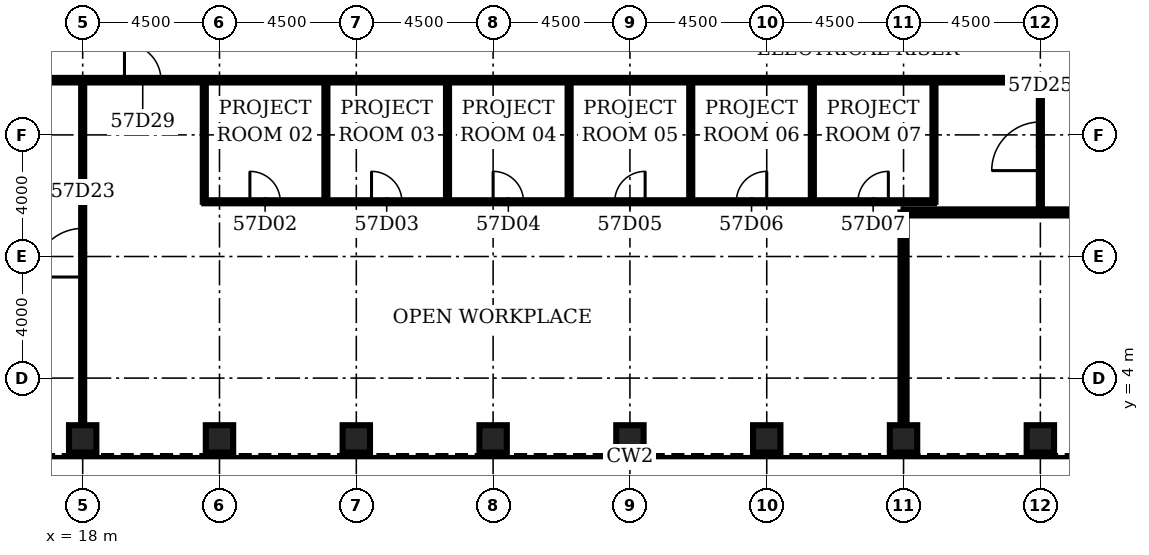
"""IFC4 building model, lengths in metres.
Left out: names, types, materials, properties, quantities, classifications, styles, units other than length and angle.
Written with IfcOpenShell. Run it as: python <this file> out.ifc"""

import sys

from ifc_helpers import new_model, si_unit, direction, frame, frame_2d, origin, origin_2d, place, context, subcontext, project, spatial, rectangle, hollow_rectangle, extrude, element, fill, save


model = new_model("IFC4")
c1 = context("Model", 3, precision=1e-05, world=origin(), true_north=direction((0.0, 1.0)))
c2 = subcontext(c1, "Body", "Model", "MODEL_VIEW")
j1 = project(units=[si_unit("LENGTHUNIT", "METRE"), si_unit("PLANEANGLEUNIT", "RADIAN")], contexts=[c1])
p1 = place(None, origin())
s1 = spatial("IfcSite", under=j1, at=p1, CompositionType="ELEMENT")
p2 = place(p1, origin())
s2 = spatial("IfcBuilding", under=s1, at=p2, CompositionType="ELEMENT")
p3 = place(p2, frame((0.0, 0.0, 253.0)))
s3 = spatial("IfcBuildingStorey", under=s2, at=p3, CompositionType="ELEMENT", Elevation=253.0)
for number, where, z_axis, x_axis in (
    (1, (18.0, 2.0, 0.0), (0.0, 0.0, 1.0), (0.0, 1.0, 0.0)),
    (2, (22.5, 2.0, 0.0), (0.0, 0.0, 1.0), (0.0, 1.0, 0.0)),
    (3, (27.0, 2.0, 0.0), (0.0, 0.0, 1.0), (0.0, 1.0, 0.0)),
    (4, (31.5, 2.0, 0.0), (0.0, 0.0, 1.0), (0.0, 1.0, 0.0)),
    (5, (36.0, 2.0, 0.0), (0.0, 0.0, 1.0), (0.0, 1.0, 0.0)),
    (6, (40.5, 2.0, 0.0), (0.0, 0.0, 1.0), (0.0, 1.0, 0.0)),
    (7, (45.0, 2.0, 0.0), (0.0, 0.0, 1.0), (0.0, 1.0, 0.0)),
    (8, (49.5, 2.0, 0.0), (0.0, 0.0, 1.0), (0.0, 1.0, 0.0)),
):
    element("IfcColumn", number, at=place(p3, frame(where, z_axis=z_axis, x_axis=x_axis)), inside=s3, PredefinedType="COLUMN", context=c2, shape_type="SweptSolid", body=[
        extrude(hollow_rectangle(XDim=0.9, YDim=0.9, WallThickness=0.07, at=origin_2d()), origin(), (0.0, 0.0, 1.0), 4.2),
    ])
p4 = place(p3, frame((45.0, 9.45, 0.0), z_axis=(0.0, 0.0, 1.0), x_axis=(1.0, 0.0, 0.0)))
e9 = element("IfcWall", 9, at=p4, inside=s3, PredefinedType="PARTITIONING", context=c2, shape_type="SweptSolid", body=[
    extrude(rectangle(XDim=18.0, YDim=0.2, at=frame_2d((9.0, 0.0))), origin(), (0.0, 0.0, 1.0), 3.0),
])
p5 = place(p4, frame((8.2, 0.0, 0.0)))
e10 = element("IfcOpeningElement", 10, at=p5, cuts=e9, PredefinedType="OPENING", context=c2, shape_type="SweptSolid", body=[
    extrude(rectangle(XDim=1.6, YDim=2.1, at=frame_2d((0.8, 1.05))), frame((0.0, 0.11, 0.0), z_axis=(0.0, -1.0, 0.0), x_axis=(1.0, 0.0, 0.0)), (0.0, 0.0, 1.0), 0.22),
])
p6 = place(p3, frame((22.0, 9.8, 0.0), z_axis=(0.0, 0.0, 1.0), x_axis=(1.0, 0.0, 0.0)))
e11 = element("IfcWall", 11, at=p6, inside=s3, PredefinedType="PARTITIONING", context=c2, shape_type="SweptSolid", body=[
    extrude(rectangle(XDim=24.0, YDim=0.1, at=frame_2d((12.0, 0.0))), origin(), (0.0, 0.0, 1.0), 3.0),
])
p7 = place(p6, frame((1.5, 0.0, 0.0)))
e12 = element("IfcOpeningElement", 12, at=p7, cuts=e11, PredefinedType="OPENING", context=c2, shape_type="SweptSolid", body=[
    extrude(rectangle(XDim=1.0, YDim=2.1, at=frame_2d((0.5, 1.05))), frame((0.0, 0.06, 0.0), z_axis=(0.0, -1.0, 0.0), x_axis=(1.0, 0.0, 0.0)), (0.0, 0.0, 1.0), 0.12),
])
p8 = place(p6, frame((5.5, 0.0, 0.0)))
e13 = element("IfcOpeningElement", 13, at=p8, cuts=e11, PredefinedType="OPENING", context=c2, shape_type="SweptSolid", body=[
    extrude(rectangle(XDim=1.0, YDim=2.1, at=frame_2d((0.5, 1.05))), frame((0.0, 0.06, 0.0), z_axis=(0.0, -1.0, 0.0), x_axis=(1.0, 0.0, 0.0)), (0.0, 0.0, 1.0), 0.12),
])
p9 = place(p6, frame((9.5, 0.0, 0.0)))
e14 = element("IfcOpeningElement", 14, at=p9, cuts=e11, PredefinedType="OPENING", context=c2, shape_type="SweptSolid", body=[
    extrude(rectangle(XDim=1.0, YDim=2.1, at=frame_2d((0.5, 1.05))), frame((0.0, 0.06, 0.0), z_axis=(0.0, -1.0, 0.0), x_axis=(1.0, 0.0, 0.0)), (0.0, 0.0, 1.0), 0.12),
])
p10 = place(p6, frame((13.5, 0.0, 0.0)))
e15 = element("IfcOpeningElement", 15, at=p10, cuts=e11, PredefinedType="OPENING", context=c2, shape_type="SweptSolid", body=[
    extrude(rectangle(XDim=1.0, YDim=2.1, at=frame_2d((0.5, 1.05))), frame((0.0, 0.06, 0.0), z_axis=(0.0, -1.0, 0.0), x_axis=(1.0, 0.0, 0.0)), (0.0, 0.0, 1.0), 0.12),
])
p11 = place(p6, frame((17.5, 0.0, 0.0)))
e16 = element("IfcOpeningElement", 16, at=p11, cuts=e11, PredefinedType="OPENING", context=c2, shape_type="SweptSolid", body=[
    extrude(rectangle(XDim=1.0, YDim=2.1, at=frame_2d((0.5, 1.05))), frame((0.0, 0.06, 0.0), z_axis=(0.0, -1.0, 0.0), x_axis=(1.0, 0.0, 0.0)), (0.0, 0.0, 1.0), 0.12),
])
p12 = place(p6, frame((21.5, 0.0, 0.0)))
e17 = element("IfcOpeningElement", 17, at=p12, cuts=e11, PredefinedType="OPENING", context=c2, shape_type="SweptSolid", body=[
    extrude(rectangle(XDim=1.0, YDim=2.1, at=frame_2d((0.5, 1.05))), frame((0.0, 0.06, 0.0), z_axis=(0.0, -1.0, 0.0), x_axis=(1.0, 0.0, 0.0)), (0.0, 0.0, 1.0), 0.12),
])
p13 = place(p3, frame((15.2, 13.8, 0.0), z_axis=(0.0, 0.0, 1.0), x_axis=(1.0, 0.0, 0.0)))
e18 = element("IfcWall", 18, at=p13, inside=s3, PredefinedType="PARTITIONING", context=c2, shape_type="SweptSolid", body=[
    extrude(rectangle(XDim=41.6, YDim=0.15, at=frame_2d((20.8, 0.0))), origin(), (0.0, 0.0, 1.0), 3.0),
])
p14 = place(p13, frame((4.175, 0.0, 0.0)))
e19 = element("IfcOpeningElement", 19, at=p14, cuts=e18, PredefinedType="OPENING", context=c2, shape_type="SweptSolid", body=[
    extrude(rectangle(XDim=1.2, YDim=2.1, at=frame_2d((0.6, 1.05))), frame((0.0, 0.085, 0.0), z_axis=(0.0, -1.0, 0.0), x_axis=(1.0, 0.0, 0.0)), (0.0, 0.0, 1.0), 0.17),
])
p15 = place(p3, frame((18.0, 2.45, 0.0), z_axis=(0.0, 0.0, 1.0), x_axis=(0.0, 1.0, 0.0)))
e20 = element("IfcWall", 20, at=p15, inside=s3, PredefinedType="PARTITIONING", context=c2, shape_type="SweptSolid", body=[
    extrude(rectangle(XDim=11.35, YDim=0.1, at=frame_2d((5.675, 0.0))), origin(), (0.0, 0.0, 1.0), 3.0),
])
p16 = place(p15, frame((4.875, 0.0, 0.0)))
e21 = element("IfcOpeningElement", 21, at=p16, cuts=e20, PredefinedType="OPENING", context=c2, shape_type="SweptSolid", body=[
    extrude(rectangle(XDim=1.6, YDim=2.1, at=frame_2d((0.8, 1.05))), frame((0.0, 0.06, 0.0), z_axis=(0.0, -1.0, 0.0), x_axis=(1.0, 0.0, 0.0)), (0.0, 0.0, 1.0), 0.12),
])
for number, where, z_axis, x_axis in (
    (22, (22.0, 9.8, 0.0), (0.0, 0.0, 1.0), (0.0, 1.0, 0.0)),
    (23, (26.0, 9.8, 0.0), (0.0, 0.0, 1.0), (0.0, 1.0, 0.0)),
    (24, (30.0, 9.8, 0.0), (0.0, 0.0, 1.0), (0.0, 1.0, 0.0)),
    (25, (34.0, 9.8, 0.0), (0.0, 0.0, 1.0), (0.0, 1.0, 0.0)),
    (26, (38.0, 9.8, 0.0), (0.0, 0.0, 1.0), (0.0, 1.0, 0.0)),
    (27, (42.0, 9.8, 0.0), (0.0, 0.0, 1.0), (0.0, 1.0, 0.0)),
):
    element("IfcWall", number, at=place(p3, frame(where, z_axis=z_axis, x_axis=x_axis)), inside=s3, PredefinedType="PARTITIONING", context=c2, shape_type="SweptSolid", body=[
        extrude(rectangle(XDim=4.0, YDim=0.1, at=frame_2d((2.0, 0.0))), origin(), (0.0, 0.0, 1.0), 3.0),
    ])
p17 = place(p3, frame((45.0, 2.45, 0.0), z_axis=(0.0, 0.0, 1.0), x_axis=(0.0, 1.0, 0.0)))
e28 = element("IfcWall", 28, at=p17, inside=s3, PredefinedType="PARTITIONING", context=c2, shape_type="SweptSolid", body=[
    extrude(rectangle(XDim=7.0, YDim=0.2, at=frame_2d((3.5, 0.0))), origin(), (0.0, 0.0, 1.0), 3.0),
])
p18 = place(p3, frame((46.0, 9.8, 0.0), z_axis=(0.0, 0.0, 1.0), x_axis=(0.0, 1.0, 0.0)))
e29 = element("IfcWall", 29, at=p18, inside=s3, PredefinedType="PARTITIONING", context=c2, shape_type="SweptSolid", body=[
    extrude(rectangle(XDim=4.0, YDim=0.1, at=frame_2d((2.0, 0.0))), origin(), (0.0, 0.0, 1.0), 3.0),
])
p19 = place(p3, frame((49.5, 9.45, 0.0), z_axis=(0.0, 0.0, 1.0), x_axis=(0.0, 1.0, 0.0)))
e30 = element("IfcWall", 30, at=p19, inside=s3, PredefinedType="PARTITIONING", context=c2, shape_type="SweptSolid", body=[
    extrude(rectangle(XDim=4.35, YDim=0.1, at=frame_2d((2.175, 0.0))), origin(), (0.0, 0.0, 1.0), 3.0),
])
p20 = place(p19, frame((1.375, 0.0, 0.0)))
e31 = element("IfcOpeningElement", 31, at=p20, cuts=e30, PredefinedType="OPENING", context=c2, shape_type="SweptSolid", body=[
    extrude(rectangle(XDim=1.6, YDim=2.1, at=frame_2d((0.8, 1.05))), frame((0.0, 0.06, 0.0), z_axis=(0.0, -1.0, 0.0), x_axis=(1.0, 0.0, 0.0)), (0.0, 0.0, 1.0), 0.12),
])
p21 = place(p7, origin())
e32 = element("IfcDoor", 32, at=p21, inside=s3, OperationType="SINGLE_SWING_LEFT", PredefinedType="DOOR", context=c2, shape_type="SweptSolid", body=[
    extrude(rectangle(XDim=1.0, YDim=2.1, at=frame_2d((0.5, 1.05))), frame((0.0, 0.025, 0.0), z_axis=(0.0, -1.0, 0.0), x_axis=(1.0, 0.0, 0.0)), (0.0, 0.0, 1.0), 0.05),
])
fill(e12, e32)
p22 = place(p8, origin())
e33 = element("IfcDoor", 33, at=p22, inside=s3, OperationType="SINGLE_SWING_LEFT", PredefinedType="DOOR", context=c2, shape_type="SweptSolid", body=[
    extrude(rectangle(XDim=1.0, YDim=2.1, at=frame_2d((0.5, 1.05))), frame((0.0, 0.025, 0.0), z_axis=(0.0, -1.0, 0.0), x_axis=(1.0, 0.0, 0.0)), (0.0, 0.0, 1.0), 0.05),
])
fill(e13, e33)
p23 = place(p9, origin())
e34 = element("IfcDoor", 34, at=p23, inside=s3, OperationType="SINGLE_SWING_LEFT", PredefinedType="DOOR", context=c2, shape_type="SweptSolid", body=[
    extrude(rectangle(XDim=1.0, YDim=2.1, at=frame_2d((0.5, 1.05))), frame((0.0, 0.025, 0.0), z_axis=(0.0, -1.0, 0.0), x_axis=(1.0, 0.0, 0.0)), (0.0, 0.0, 1.0), 0.05),
])
fill(e14, e34)
p24 = place(p10, origin())
e35 = element("IfcDoor", 35, at=p24, inside=s3, OperationType="SINGLE_SWING_RIGHT", PredefinedType="DOOR", context=c2, shape_type="SweptSolid", body=[
    extrude(rectangle(XDim=1.0, YDim=2.1, at=frame_2d((0.5, 1.05))), frame((0.0, 0.025, 0.0), z_axis=(0.0, -1.0, 0.0), x_axis=(1.0, 0.0, 0.0)), (0.0, 0.0, 1.0), 0.05),
])
fill(e15, e35)
p25 = place(p11, origin())
e36 = element("IfcDoor", 36, at=p25, inside=s3, OperationType="SINGLE_SWING_RIGHT", PredefinedType="DOOR", context=c2, shape_type="SweptSolid", body=[
    extrude(rectangle(XDim=1.0, YDim=2.1, at=frame_2d((0.5, 1.05))), frame((0.0, 0.025, 0.0), z_axis=(0.0, -1.0, 0.0), x_axis=(1.0, 0.0, 0.0)), (0.0, 0.0, 1.0), 0.05),
])
fill(e16, e36)
p26 = place(p12, origin())
e37 = element("IfcDoor", 37, at=p26, inside=s3, OperationType="SINGLE_SWING_RIGHT", PredefinedType="DOOR", context=c2, shape_type="SweptSolid", body=[
    extrude(rectangle(XDim=1.0, YDim=2.1, at=frame_2d((0.5, 1.05))), frame((0.0, 0.025, 0.0), z_axis=(0.0, -1.0, 0.0), x_axis=(1.0, 0.0, 0.0)), (0.0, 0.0, 1.0), 0.05),
])
fill(e17, e37)
p27 = place(p16, origin())
e38 = element("IfcDoor", 38, at=p27, inside=s3, OperationType="SINGLE_SWING_LEFT", PredefinedType="DOOR", context=c2, shape_type="SweptSolid", body=[
    extrude(rectangle(XDim=1.6, YDim=2.1, at=frame_2d((0.8, 1.05))), frame((0.0, 0.025, 0.0), z_axis=(0.0, -1.0, 0.0), x_axis=(1.0, 0.0, 0.0)), (0.0, 0.0, 1.0), 0.05),
])
fill(e21, e38)
p28 = place(p20, origin())
e39 = element("IfcDoor", 39, at=p28, inside=s3, OperationType="SINGLE_SWING_LEFT", PredefinedType="DOOR", context=c2, shape_type="SweptSolid", body=[
    extrude(rectangle(XDim=1.6, YDim=2.1, at=frame_2d((0.8, 1.05))), frame((0.0, 0.025, 0.0), z_axis=(0.0, -1.0, 0.0), x_axis=(1.0, 0.0, 0.0)), (0.0, 0.0, 1.0), 0.05),
])
fill(e31, e39)
p29 = place(p14, origin())
e40 = element("IfcDoor", 40, at=p29, inside=s3, OperationType="SINGLE_SWING_LEFT", PredefinedType="DOOR", context=c2, shape_type="SweptSolid", body=[
    extrude(rectangle(XDim=1.2, YDim=2.1, at=frame_2d((0.6, 1.05))), frame((0.0, 0.025, 0.0), z_axis=(0.0, -1.0, 0.0), x_axis=(1.0, 0.0, 0.0)), (0.0, 0.0, 1.0), 0.05),
])
fill(e19, e40)
save(model, sys.argv[1])
